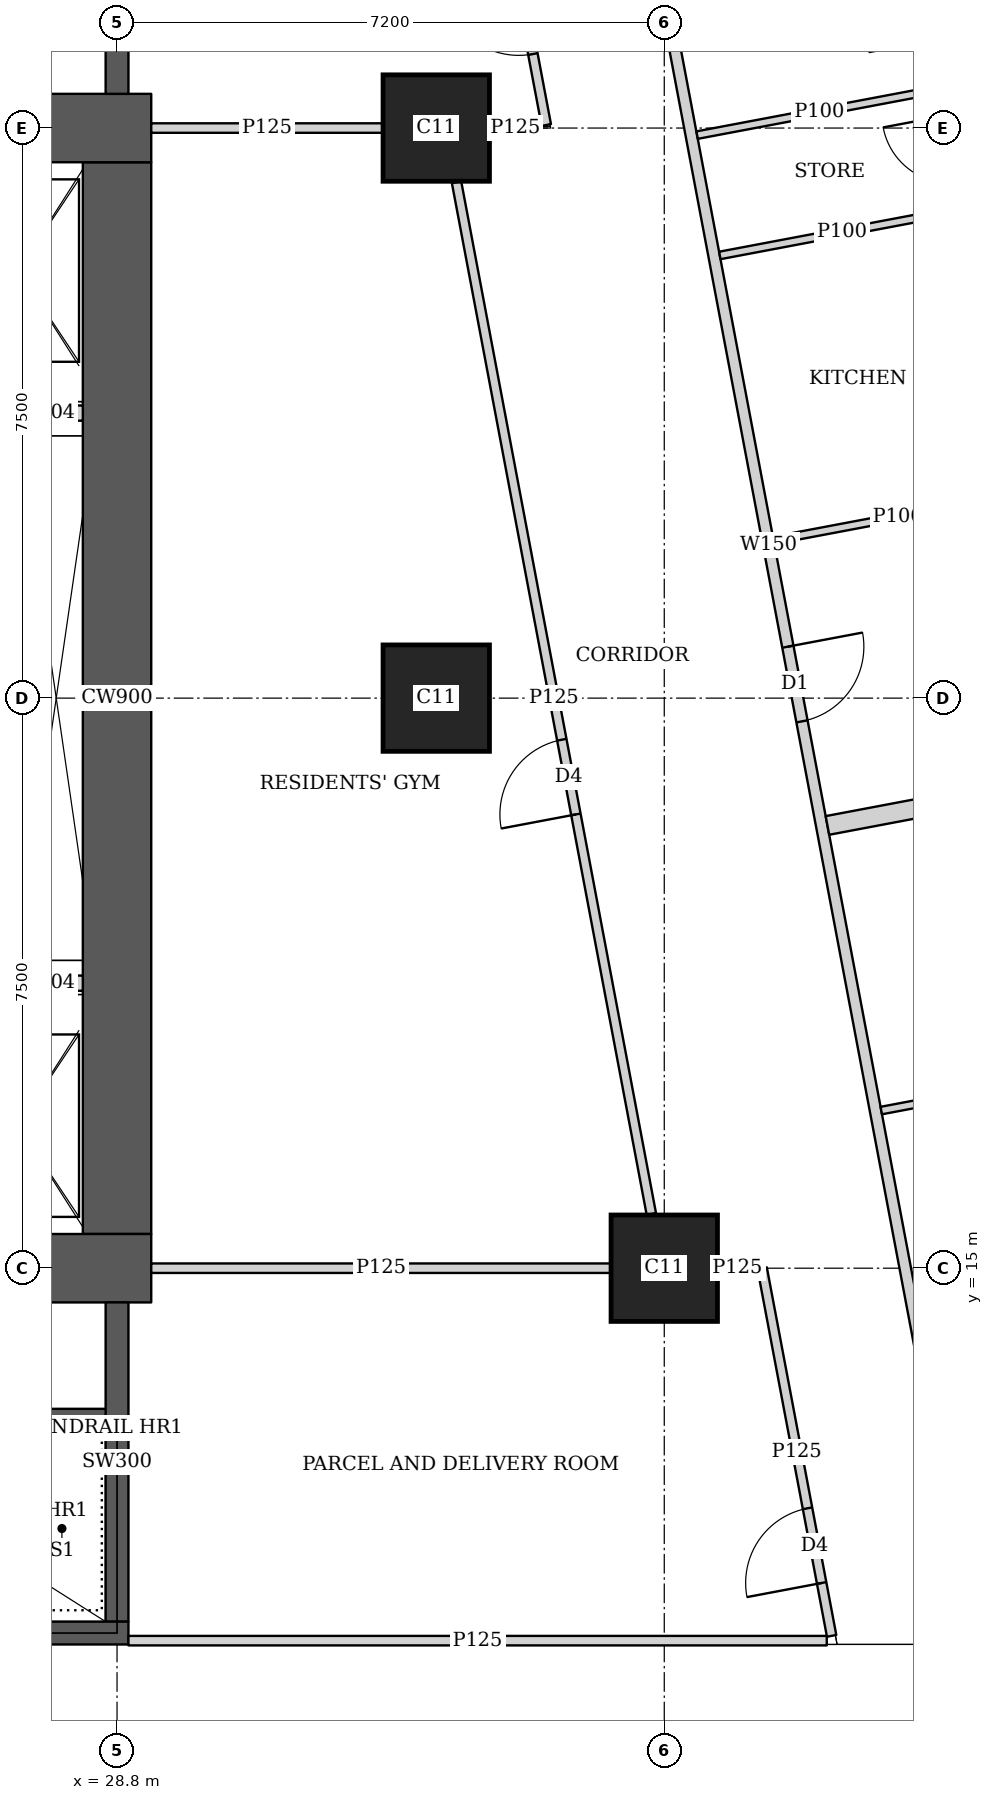
"""IFC4 building model, lengths in metres.
Left out: names, types, materials, properties, quantities, classifications, styles, units other than length and angle.
Written with IfcOpenShell. Run it as: python <this file> out.ifc"""

import sys

from ifc_helpers import new_model, si_unit, direction, frame, frame_2d, origin, origin_2d, place, context, subcontext, project, spatial, rectangle, extrude, element, fill, save


model = new_model("IFC4")
c1 = context("Model", 3, precision=1e-05, world=origin(), true_north=direction((0.0, 1.0)))
c2 = subcontext(c1, "Body", "Model", "MODEL_VIEW")
j1 = project(units=[si_unit("LENGTHUNIT", "METRE"), si_unit("PLANEANGLEUNIT", "RADIAN")], contexts=[c1])
p1 = place(None, origin())
s1 = spatial("IfcSite", under=j1, at=p1, CompositionType="ELEMENT")
p2 = place(p1, origin())
s2 = spatial("IfcBuilding", under=s1, at=p2, CompositionType="ELEMENT")
p3 = place(p2, frame((0.0, 0.0, 289.1)))
s3 = spatial("IfcBuildingStorey", under=s2, at=p3, CompositionType="ELEMENT", Elevation=289.1)
for number, where, z_axis, x_axis in (
    (1, (36.0, 15.0, 0.0), (0.0, 0.0, 1.0), (1.0, 0.0, 0.0)),
    (2, (33.0, 22.5, 0.0), (0.0, 0.0, 1.0), (1.0, 0.0, 0.0)),
    (3, (33.0, 30.0, 0.0), (0.0, 0.0, 1.0), (1.0, 0.0, 0.0)),
):
    element("IfcColumn", number, at=place(p3, frame(where, z_axis=z_axis, x_axis=x_axis)), inside=s3, PredefinedType="COLUMN", context=c2, shape_type="SweptSolid", body=[
        extrude(rectangle(XDim=1.4, YDim=1.4, at=origin_2d()), origin(), (0.0, 0.0, 1.0), 3.75),
    ])
p4 = place(p3, frame((13.95, 15.0, 0.0), z_axis=(0.0, 0.0, 1.0), x_axis=(1.0, 0.0, 0.0)))
e4 = element("IfcWall", 4, at=p4, inside=s3, PredefinedType="SHEAR", context=c2, shape_type="SweptSolid", body=[
    extrude(rectangle(XDim=15.3, YDim=0.9, at=frame_2d((7.65, 0.0))), origin(), (0.0, 0.0, 1.0), 3.75),
])
p5 = place(p4, frame((4.45, 0.0, 0.0)))
e5 = element("IfcOpeningElement", 5, at=p5, cuts=e4, PredefinedType="OPENING", context=c2, shape_type="SweptSolid", body=[
    extrude(rectangle(XDim=1.8, YDim=2.1, at=frame_2d((0.9, 1.05))), frame((0.0, 0.46, 0.0), z_axis=(0.0, -1.0, 0.0), x_axis=(1.0, 0.0, 0.0)), (0.0, 0.0, 1.0), 0.92),
])
p6 = place(p4, frame((10.7, 0.0, 0.0)))
e6 = element("IfcOpeningElement", 6, at=p6, cuts=e4, PredefinedType="OPENING", context=c2, shape_type="SweptSolid", body=[
    extrude(rectangle(XDim=1.1, YDim=2.1, at=frame_2d((0.55, 1.05))), frame((0.0, 0.46, 0.0), z_axis=(0.0, -1.0, 0.0), x_axis=(1.0, 0.0, 0.0)), (0.0, 0.0, 1.0), 0.92),
])
p7 = place(p3, frame((13.95, 30.0, 0.0), z_axis=(0.0, 0.0, 1.0), x_axis=(1.0, 0.0, 0.0)))
e7 = element("IfcWall", 7, at=p7, inside=s3, PredefinedType="SHEAR", context=c2, shape_type="SweptSolid", body=[
    extrude(rectangle(XDim=15.3, YDim=0.9, at=frame_2d((7.65, 0.0))), origin(), (0.0, 0.0, 1.0), 3.75),
])
p8 = place(p7, frame((4.45, 0.0, 0.0)))
e8 = element("IfcOpeningElement", 8, at=p8, cuts=e7, PredefinedType="OPENING", context=c2, shape_type="SweptSolid", body=[
    extrude(rectangle(XDim=1.8, YDim=2.1, at=frame_2d((0.9, 1.05))), frame((0.0, 0.46, 0.0), z_axis=(0.0, -1.0, 0.0), x_axis=(1.0, 0.0, 0.0)), (0.0, 0.0, 1.0), 0.92),
])
p9 = place(p7, frame((10.7, 0.0, 0.0)))
e9 = element("IfcOpeningElement", 9, at=p9, cuts=e7, PredefinedType="OPENING", context=c2, shape_type="SweptSolid", body=[
    extrude(rectangle(XDim=1.1, YDim=2.1, at=frame_2d((0.55, 1.05))), frame((0.0, 0.46, 0.0), z_axis=(0.0, -1.0, 0.0), x_axis=(1.0, 0.0, 0.0)), (0.0, 0.0, 1.0), 0.92),
])
p10 = place(p3, frame((28.8, 15.45, 0.0), z_axis=(0.0, 0.0, 1.0), x_axis=(0.0, 1.0, 0.0)))
e10 = element("IfcWall", 10, at=p10, inside=s3, PredefinedType="SHEAR", context=c2, shape_type="SweptSolid", body=[
    extrude(rectangle(XDim=14.1, YDim=0.9, at=frame_2d((7.05, 0.0))), origin(), (0.0, 0.0, 1.0), 3.75),
])
p11 = place(p3, frame((21.45, 10.2, 0.0), z_axis=(0.0, 0.0, 1.0), x_axis=(1.0, 0.0, 0.0)))
e11 = element("IfcWall", 11, at=p11, inside=s3, PredefinedType="SHEAR", context=c2, shape_type="SweptSolid", body=[
    extrude(rectangle(XDim=7.5, YDim=0.3, at=frame_2d((3.75, 0.0))), origin(), (0.0, 0.0, 1.0), 3.75),
])
p12 = place(p11, frame((1.2, 0.0, 0.0)))
e12 = element("IfcOpeningElement", 12, at=p12, cuts=e11, PredefinedType="OPENING", context=c2, shape_type="SweptSolid", body=[
    extrude(rectangle(XDim=1.1, YDim=2.1, at=frame_2d((0.55, 1.05))), frame((0.0, 0.16, 0.0), z_axis=(0.0, -1.0, 0.0), x_axis=(1.0, 0.0, 0.0)), (0.0, 0.0, 1.0), 0.32),
])
for number, where, z_axis, x_axis in (
    (13, (28.8, 10.35, 0.0), (0.0, 0.0, 1.0), (0.0, 1.0, 0.0)),
    (14, (28.8, 30.45, 0.0), (0.0, 0.0, 1.0), (0.0, 1.0, 0.0)),
):
    element("IfcWall", number, at=place(p3, frame(where, z_axis=z_axis, x_axis=x_axis)), inside=s3, PredefinedType="SHEAR", context=c2, shape_type="SweptSolid", body=[
        extrude(rectangle(XDim=4.2, YDim=0.3, at=frame_2d((2.1, 0.0))), origin(), (0.0, 0.0, 1.0), 3.75),
    ])
p13 = place(p3, frame((34.036, 42.186, 0.0), z_axis=(0.0, 0.0, 1.0), x_axis=(0.185593518645, -0.9826266055, 0.0)))
e15 = element("IfcWall", 15, at=p13, inside=s3, PredefinedType="SOLIDWALL", context=c2, shape_type="SweptSolid", body=[
    extrude(rectangle(XDim=35.961, YDim=0.15, at=frame_2d((17.98, 0.0))), origin(), (0.0, 0.0, 1.0), 2.5),
])
p14 = place(p13, frame((19.345, 0.0, 0.0)))
e16 = element("IfcOpeningElement", 16, at=p14, cuts=e15, PredefinedType="OPENING", context=c2, shape_type="SweptSolid", body=[
    extrude(rectangle(XDim=1.0, YDim=2.1, at=frame_2d((0.5, 1.05))), frame((0.0, 0.085, 0.0), z_axis=(0.0, -1.0, 0.0), x_axis=(1.0, 0.0, 0.0)), (0.0, 0.0, 1.0), 0.17),
])
p15 = place(p13, frame((33.774, 0.0, 0.0)))
e17 = element("IfcOpeningElement", 17, at=p15, cuts=e15, PredefinedType="OPENING", context=c2, shape_type="SweptSolid", body=[
    extrude(rectangle(XDim=1.0, YDim=2.1, at=frame_2d((0.5, 1.05))), frame((0.0, 0.085, 0.0), z_axis=(0.0, -1.0, 0.0), x_axis=(1.0, 0.0, 0.0)), (0.0, 0.0, 1.0), 0.17),
])
p16 = place(p3, frame((39.948, 28.932, 0.0), z_axis=(0.0, 0.0, 1.0), x_axis=(-0.982610347627, -0.185679575441, 0.0)))
e18 = element("IfcWall", 18, at=p16, inside=s3, PredefinedType="PARTITIONING", context=c2, shape_type="SweptSolid", body=[
    extrude(rectangle(XDim=3.274, YDim=0.1, at=frame_2d((1.637, 0.0))), origin(), (0.0, 0.0, 1.0), 3.5),
])
p17 = place(p3, frame((40.706, 25.192, 0.0), z_axis=(0.0, 0.0, 1.0), x_axis=(-0.982633623707, -0.185556356831, 0.0)))
e19 = element("IfcWall", 19, at=p17, inside=s3, PredefinedType="PARTITIONING", context=c2, shape_type="SweptSolid", body=[
    extrude(rectangle(XDim=3.325, YDim=0.1, at=frame_2d((1.663, 0.0))), origin(), (0.0, 0.0, 1.0), 3.5),
])
p18 = place(p3, frame((39.649, 30.515, 0.0), z_axis=(0.0, 0.0, 1.0), x_axis=(-0.982610347627, -0.185679575441, 0.0)))
e20 = element("IfcWall", 20, at=p18, inside=s3, PredefinedType="PARTITIONING", context=c2, shape_type="SweptSolid", body=[
    extrude(rectangle(XDim=3.274, YDim=0.1, at=frame_2d((1.637, 0.0))), origin(), (0.0, 0.0, 1.0), 2.5),
])
p19 = place(p3, frame((37.591, 41.685, 0.0), z_axis=(0.0, 0.0, 1.0), x_axis=(0.185541820726, -0.982636368532, 0.0)))
e21 = element("IfcWall", 21, at=p19, inside=s3, PredefinedType="PARTITIONING", context=c2, shape_type="SweptSolid", body=[
    extrude(rectangle(XDim=16.735, YDim=0.1, at=frame_2d((8.367, 0.0))), origin(), (0.0, 0.0, 1.0), 2.5),
])
p20 = place(p19, frame((2.413, 0.0, 0.0)))
e22 = element("IfcOpeningElement", 22, at=p20, cuts=e21, PredefinedType="OPENING", context=c2, shape_type="SweptSolid", body=[
    extrude(rectangle(XDim=0.9, YDim=2.1, at=frame_2d((0.45, 1.05))), frame((0.0, 0.06, 0.0), z_axis=(0.0, -1.0, 0.0), x_axis=(1.0, 0.0, 0.0)), (0.0, 0.0, 1.0), 0.12),
])
p21 = place(p19, frame((6.713, 0.0, 0.0)))
e23 = element("IfcOpeningElement", 23, at=p21, cuts=e21, PredefinedType="OPENING", context=c2, shape_type="SweptSolid", body=[
    extrude(rectangle(XDim=0.9, YDim=2.1, at=frame_2d((0.45, 1.05))), frame((0.0, 0.06, 0.0), z_axis=(0.0, -1.0, 0.0), x_axis=(1.0, 0.0, 0.0)), (0.0, 0.0, 1.0), 0.12),
])
p22 = place(p19, frame((9.805, 0.0, 0.0)))
e24 = element("IfcOpeningElement", 24, at=p22, cuts=e21, PredefinedType="OPENING", context=c2, shape_type="SweptSolid", body=[
    extrude(rectangle(XDim=0.9, YDim=2.1, at=frame_2d((0.45, 1.05))), frame((0.0, 0.06, 0.0), z_axis=(0.0, -1.0, 0.0), x_axis=(1.0, 0.0, 0.0)), (0.0, 0.0, 1.0), 0.12),
])
p23 = place(p19, frame((11.713, 0.0, 0.0)))
e25 = element("IfcOpeningElement", 25, at=p23, cuts=e21, PredefinedType="OPENING", context=c2, shape_type="SweptSolid", body=[
    extrude(rectangle(XDim=0.9, YDim=2.1, at=frame_2d((0.45, 1.05))), frame((0.0, 0.06, 0.0), z_axis=(0.0, -1.0, 0.0), x_axis=(1.0, 0.0, 0.0)), (0.0, 0.0, 1.0), 0.12),
])
p24 = place(p19, frame((14.426, 0.0, 0.0)))
e26 = element("IfcOpeningElement", 26, at=p24, cuts=e21, PredefinedType="OPENING", context=c2, shape_type="SweptSolid", body=[
    extrude(rectangle(XDim=0.9, YDim=2.1, at=frame_2d((0.45, 1.05))), frame((0.0, 0.06, 0.0), z_axis=(0.0, -1.0, 0.0), x_axis=(1.0, 0.0, 0.0)), (0.0, 0.0, 1.0), 0.12),
])
p25 = place(p3, frame((42.593, 21.665, 0.0), z_axis=(0.0, 0.0, 1.0), x_axis=(-0.982612837616, -0.185666398014, 0.0)))
e27 = element("IfcWall", 27, at=p25, inside=s3, PredefinedType="SOLIDWALL", context=c2, shape_type="SweptSolid", body=[
    extrude(rectangle(XDim=4.525, YDim=0.25, at=frame_2d((2.262, 0.0))), origin(), (0.0, 0.0, 1.0), 2.5),
])
p26 = place(p3, frame((42.073, 17.682, 0.0), z_axis=(0.0, 0.0, 1.0), x_axis=(-0.982620626894, -0.185625169636, 0.0)))
e28 = element("IfcWall", 28, at=p26, inside=s3, PredefinedType="PARTITIONING", context=c2, shape_type="SweptSolid", body=[
    extrude(rectangle(XDim=3.275, YDim=0.1, at=frame_2d((1.637, 0.0))), origin(), (0.0, 0.0, 1.0), 3.5),
])
p27 = place(p3, frame((28.95, 10.1, 0.0), z_axis=(0.0, 0.0, 1.0), x_axis=(1.0, 0.0, 0.0)))
e29 = element("IfcWall", 29, at=p27, inside=s3, PredefinedType="PARTITIONING", context=c2, shape_type="SweptSolid", body=[
    extrude(rectangle(XDim=9.188, YDim=0.125, at=frame_2d((4.594, 0.0))), origin(), (0.0, 0.0, 1.0), 3.5),
])
p28 = place(p3, frame((38.202, 10.163, 0.0), z_axis=(0.0, 0.0, 1.0), x_axis=(-0.185641892853, 0.982617467593, 0.0)))
e30 = element("IfcWall", 30, at=p28, inside=s3, PredefinedType="PARTITIONING", context=c2, shape_type="SweptSolid", body=[
    extrude(rectangle(XDim=4.922, YDim=0.125, at=frame_2d((2.461, 0.0))), origin(), (0.0, 0.0, 1.0), 3.5),
])
p29 = place(p28, frame((0.708, 0.0, 0.0)))
e31 = element("IfcOpeningElement", 31, at=p29, cuts=e30, PredefinedType="OPENING", context=c2, shape_type="SweptSolid", body=[
    extrude(rectangle(XDim=1.0, YDim=2.1, at=frame_2d((0.5, 1.05))), frame((0.0, 0.073, 0.0), z_axis=(0.0, -1.0, 0.0), x_axis=(1.0, 0.0, 0.0)), (0.0, 0.0, 1.0), 0.145),
])
p30 = place(p3, frame((34.448, 30.04, 0.0), z_axis=(0.0, 0.0, 1.0), x_axis=(-0.185749459238, 0.982597139418, 0.0)))
e32 = element("IfcWall", 32, at=p30, inside=s3, PredefinedType="PARTITIONING", context=c2, shape_type="SweptSolid", body=[
    extrude(rectangle(XDim=4.883, YDim=0.125, at=frame_2d((2.441, 0.0))), origin(), (0.0, 0.0, 1.0), 2.5),
])
p31 = place(p30, frame((0.95, 0.0, 0.0)))
e33 = element("IfcOpeningElement", 33, at=p31, cuts=e32, PredefinedType="OPENING", context=c2, shape_type="SweptSolid", body=[
    extrude(rectangle(XDim=1.0, YDim=2.1, at=frame_2d((0.5, 1.05))), frame((0.0, 0.073, 0.0), z_axis=(0.0, -1.0, 0.0), x_axis=(1.0, 0.0, 0.0)), (0.0, 0.0, 1.0), 0.145),
])
p32 = place(p30, frame((3.225, 0.0, 0.0)))
e34 = element("IfcOpeningElement", 34, at=p32, cuts=e32, PredefinedType="OPENING", context=c2, shape_type="SweptSolid", body=[
    extrude(rectangle(XDim=1.0, YDim=2.1, at=frame_2d((0.5, 1.05))), frame((0.0, 0.073, 0.0), z_axis=(0.0, -1.0, 0.0), x_axis=(1.0, 0.0, 0.0)), (0.0, 0.0, 1.0), 0.145),
])
p33 = place(p3, frame((35.83, 15.713, 0.0), z_axis=(0.0, 0.0, 1.0), x_axis=(-0.185534724166, 0.982637708481, 0.0)))
e35 = element("IfcWall", 35, at=p33, inside=s3, PredefinedType="PARTITIONING", context=c2, shape_type="SweptSolid", body=[
    extrude(rectangle(XDim=13.814, YDim=0.125, at=frame_2d((6.907, 0.0))), origin(), (0.0, 0.0, 1.0), 2.5),
])
p34 = place(p33, frame((5.35, 0.0, 0.0)))
e36 = element("IfcOpeningElement", 36, at=p34, cuts=e35, PredefinedType="OPENING", context=c2, shape_type="SweptSolid", body=[
    extrude(rectangle(XDim=1.0, YDim=2.1, at=frame_2d((0.5, 1.05))), frame((0.0, 0.073, 0.0), z_axis=(0.0, -1.0, 0.0), x_axis=(1.0, 0.0, 0.0)), (0.0, 0.0, 1.0), 0.145),
])
p35 = place(p3, frame((29.25, 15.0, 0.0), z_axis=(0.0, 0.0, 1.0), x_axis=(1.0, 0.0, 0.0)))
e37 = element("IfcWall", 37, at=p35, inside=s3, PredefinedType="PARTITIONING", context=c2, shape_type="SweptSolid", body=[
    extrude(rectangle(XDim=6.049, YDim=0.125, at=frame_2d((3.024, 0.0))), origin(), (0.0, 0.0, 1.0), 3.5),
])
p36 = place(p3, frame((36.701, 15.0, 0.0), z_axis=(0.0, 0.0, 1.0), x_axis=(1.0, 0.0, 0.0)))
e38 = element("IfcWall", 38, at=p36, inside=s3, PredefinedType="PARTITIONING", context=c2, shape_type="SweptSolid", body=[
    extrude(rectangle(XDim=0.526, YDim=0.125, at=frame_2d((0.263, 0.0))), origin(), (0.0, 0.0, 1.0), 3.5),
])
p37 = place(p3, frame((29.25, 30.0, 0.0), z_axis=(0.0, 0.0, 1.0), x_axis=(1.0, 0.0, 0.0)))
e39 = element("IfcWall", 39, at=p37, inside=s3, PredefinedType="PARTITIONING", context=c2, shape_type="SweptSolid", body=[
    extrude(rectangle(XDim=3.049, YDim=0.125, at=frame_2d((1.524, 0.0))), origin(), (0.0, 0.0, 1.0), 3.5),
])
p38 = place(p3, frame((33.701, 30.0, 0.0), z_axis=(0.0, 0.0, 1.0), x_axis=(1.0, 0.0, 0.0)))
e40 = element("IfcWall", 40, at=p38, inside=s3, PredefinedType="PARTITIONING", context=c2, shape_type="SweptSolid", body=[
    extrude(rectangle(XDim=0.679, YDim=0.125, at=frame_2d((0.339, 0.0))), origin(), (0.0, 0.0, 1.0), 2.5),
])
p39 = place(p3, frame((23.0, 13.05, 0.0), z_axis=(0.0, 0.0, 1.0), x_axis=(1.0, 0.0, 0.0)))
e41 = element("IfcWall", 41, at=p39, inside=s3, PredefinedType="SHEAR", context=c2, shape_type="SweptSolid", body=[
    extrude(rectangle(XDim=5.8, YDim=0.2, at=frame_2d((2.9, 0.0))), origin(), (0.0, 0.0, 1.0), 3.75),
])
for number, where, z_axis, x_axis in (
    (42, (27.4, 18.75, 0.0), (0.0, 0.0, 1.0), (1.0, 0.0, 0.0)),
    (43, (27.4, 26.25, 0.0), (0.0, 0.0, 1.0), (1.0, 0.0, 0.0)),
):
    element("IfcWall", number, at=place(p3, frame(where, z_axis=z_axis, x_axis=x_axis)), inside=s3, PredefinedType="SOLIDWALL", context=c2, shape_type="SweptSolid", body=[
        extrude(rectangle(XDim=0.95, YDim=0.2, at=frame_2d((0.475, 0.0))), origin(), (0.0, 0.0, 1.0), 3.5),
    ])
p40 = place(p14, origin())
e44 = element("IfcDoor", 44, at=p40, inside=s3, OperationType="SINGLE_SWING_LEFT", PredefinedType="DOOR", context=c2, shape_type="SweptSolid", body=[
    extrude(rectangle(XDim=1.0, YDim=2.1, at=frame_2d((0.5, 1.05))), frame((0.0, 0.025, 0.0), z_axis=(0.0, -1.0, 0.0), x_axis=(1.0, 0.0, 0.0)), (0.0, 0.0, 1.0), 0.05),
])
fill(e16, e44)
p41 = place(p29, origin())
e45 = element("IfcDoor", 45, at=p41, inside=s3, OperationType="SINGLE_SWING_LEFT", PredefinedType="DOOR", context=c2, shape_type="SweptSolid", body=[
    extrude(rectangle(XDim=1.0, YDim=2.1, at=frame_2d((0.5, 1.05))), frame((0.0, 0.025, 0.0), z_axis=(0.0, -1.0, 0.0), x_axis=(1.0, 0.0, 0.0)), (0.0, 0.0, 1.0), 0.05),
])
fill(e31, e45)
p42 = place(p34, origin())
e46 = element("IfcDoor", 46, at=p42, inside=s3, OperationType="SINGLE_SWING_LEFT", PredefinedType="DOOR", context=c2, shape_type="SweptSolid", body=[
    extrude(rectangle(XDim=1.0, YDim=2.1, at=frame_2d((0.5, 1.05))), frame((0.0, 0.025, 0.0), z_axis=(0.0, -1.0, 0.0), x_axis=(1.0, 0.0, 0.0)), (0.0, 0.0, 1.0), 0.05),
])
fill(e36, e46)
p43 = place(p31, origin())
e47 = element("IfcDoor", 47, at=p43, inside=s3, OperationType="SINGLE_SWING_RIGHT", PredefinedType="DOOR", context=c2, shape_type="SweptSolid", body=[
    extrude(rectangle(XDim=1.0, YDim=2.1, at=frame_2d((0.5, 1.05))), frame((0.0, 0.025, 0.0), z_axis=(0.0, -1.0, 0.0), x_axis=(1.0, 0.0, 0.0)), (0.0, 0.0, 1.0), 0.05),
])
fill(e33, e47)
save(model, sys.argv[1])
